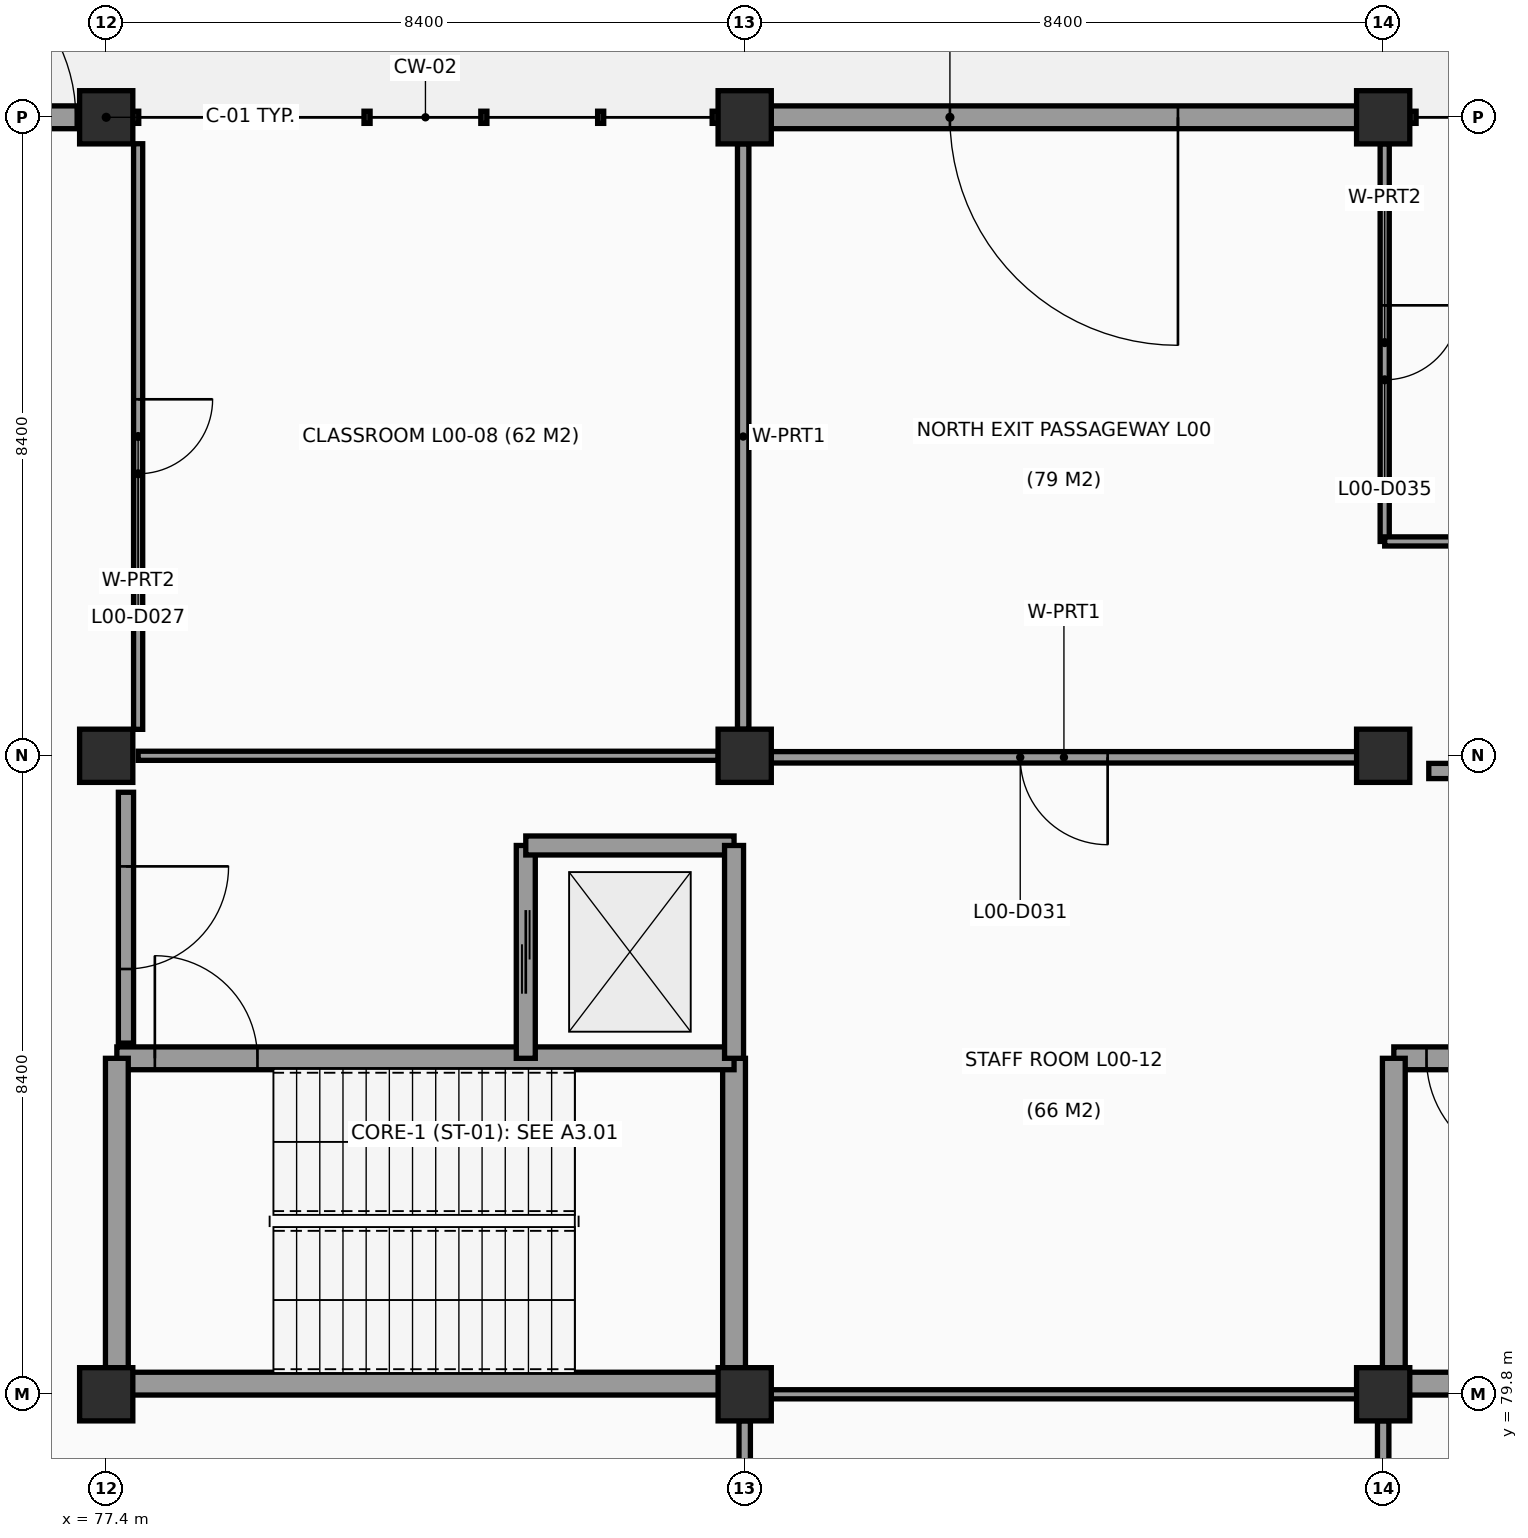
"""IFC4 building model, lengths in metres.
Left out: names, types, materials, properties, quantities, classifications, styles, units other than length and angle.
Written with IfcOpenShell. Run it as: python <this file> out.ifc"""

import sys

from ifc_helpers import new_model, si_unit, direction, frame, frame_2d, origin, origin_2d, place, context, subcontext, project, spatial, rectangle, extrude, element, fill, save


model = new_model("IFC4")
c1 = context("Model", 3, precision=1e-05, world=origin(), true_north=direction((0.0, 1.0)))
c2 = subcontext(c1, "Body", "Model", "MODEL_VIEW")
j1 = project(units=[si_unit("LENGTHUNIT", "METRE"), si_unit("PLANEANGLEUNIT", "RADIAN")], contexts=[c1])
p1 = place(None, origin())
s1 = spatial("IfcSite", under=j1, at=p1, CompositionType="ELEMENT")
p2 = place(p1, origin())
s2 = spatial("IfcBuilding", under=s1, at=p2, CompositionType="ELEMENT")
p3 = place(p2, origin())
s3 = spatial("IfcBuildingStorey", under=s2, at=p3, CompositionType="ELEMENT", Elevation=0.0)
for number, where, z_axis, x_axis in (
    (1, (77.4, 79.8, -0.4), (0.0, 0.0, 1.0), (1.0, 0.0, 0.0)),
    (2, (77.4, 88.2, -0.4), (0.0, 0.0, 1.0), (1.0, 0.0, 0.0)),
    (3, (77.4, 96.6, -0.4), (0.0, 0.0, 1.0), (1.0, 0.0, 0.0)),
    (4, (85.8, 79.8, -0.4), (0.0, 0.0, 1.0), (1.0, 0.0, 0.0)),
    (5, (85.8, 88.2, -0.4), (0.0, 0.0, 1.0), (1.0, 0.0, 0.0)),
    (6, (85.8, 96.6, -0.4), (0.0, 0.0, 1.0), (1.0, 0.0, 0.0)),
    (7, (94.2, 79.8, -0.4), (0.0, 0.0, 1.0), (1.0, 0.0, 0.0)),
    (8, (94.2, 88.2, -0.4), (0.0, 0.0, 1.0), (1.0, 0.0, 0.0)),
    (9, (94.2, 96.6, -0.4), (0.0, 0.0, 1.0), (1.0, 0.0, 0.0)),
):
    element("IfcColumn", number, at=place(p3, frame(where, z_axis=z_axis, x_axis=x_axis)), inside=s3, PredefinedType="COLUMN", context=c2, shape_type="SweptSolid", body=[
        extrude(rectangle(XDim=0.7, YDim=0.7, at=origin_2d()), origin(), (0.0, 0.0, 1.0), 4.6),
    ])
p4 = place(p3, frame((74.723, 96.6, 0.0), z_axis=(0.0, 0.0, 1.0), x_axis=(1.0, 0.0, 0.0)))
e10 = element("IfcWall", 10, at=p4, inside=s3, PredefinedType="SOLIDWALL", context=c2, shape_type="SweptSolid", body=[
    extrude(rectangle(XDim=2.329, YDim=0.3, at=frame_2d((1.165, 0.0))), origin(), (0.0, 0.0, 1.0), 3.22),
])
p5 = place(p4, frame((0.077, 0.0, 0.0)))
e11 = element("IfcOpeningElement", 11, at=p5, cuts=e10, PredefinedType="OPENING", context=c2, shape_type="SweptSolid", body=[
    extrude(rectangle(XDim=2.2, YDim=2.35, at=frame_2d((1.1, 1.175))), frame((0.0, 0.16, 0.0), z_axis=(0.0, -1.0, 0.0), x_axis=(1.0, 0.0, 0.0)), (0.0, 0.0, 1.0), 0.32),
])
p6 = place(p3, frame((86.148, 96.6, 0.0), z_axis=(0.0, 0.0, 1.0), x_axis=(1.0, 0.0, 0.0)))
e12 = element("IfcWall", 12, at=p6, inside=s3, PredefinedType="SOLIDWALL", context=c2, shape_type="SweptSolid", body=[
    extrude(rectangle(XDim=7.704, YDim=0.3, at=frame_2d((3.852, 0.0))), origin(), (0.0, 0.0, 1.0), 3.22),
])
p7 = place(p6, frame((2.352, 0.0, 0.0)))
e13 = element("IfcOpeningElement", 13, at=p7, cuts=e12, PredefinedType="OPENING", context=c2, shape_type="SweptSolid", body=[
    extrude(rectangle(XDim=3.0, YDim=2.5, at=frame_2d((1.5, 1.25))), frame((0.0, 0.16, 0.0), z_axis=(0.0, -1.0, 0.0), x_axis=(1.0, 0.0, 0.0)), (0.0, 0.0, 1.0), 0.32),
])
p8 = place(p3, frame((77.54, 79.94, -0.4), z_axis=(0.0, 0.0, 1.0), x_axis=(1.0, 0.0, 0.0)))
e14 = element("IfcWall", 14, at=p8, inside=s3, PredefinedType="SHEAR", context=c2, shape_type="SweptSolid", body=[
    extrude(rectangle(XDim=8.12, YDim=0.3, at=frame_2d((4.06, 0.0))), origin(), (0.0, 0.0, 1.0), 4.6),
])
p9 = place(p3, frame((85.66, 79.94, -0.4), z_axis=(0.0, 0.0, 1.0), x_axis=(0.0, 1.0, 0.0)))
e15 = element("IfcWall", 15, at=p9, inside=s3, PredefinedType="SHEAR", context=c2, shape_type="SweptSolid", body=[
    extrude(rectangle(XDim=4.28, YDim=0.3, at=frame_2d((2.14, 0.0))), origin(), (0.0, 0.0, 1.0), 4.6),
])
p10 = place(p3, frame((85.66, 84.22, -0.4), z_axis=(0.0, 0.0, 1.0), x_axis=(-1.0, 0.0, 0.0)))
e16 = element("IfcWall", 16, at=p10, inside=s3, PredefinedType="SHEAR", context=c2, shape_type="SweptSolid", body=[
    extrude(rectangle(XDim=8.12, YDim=0.3, at=frame_2d((4.06, 0.0))), origin(), (0.0, 0.0, 1.0), 4.6),
])
p11 = place(p10, frame((6.27, 0.0, 0.4)))
e17 = element("IfcOpeningElement", 17, at=p11, cuts=e16, PredefinedType="OPENING", context=c2, shape_type="SweptSolid", body=[
    extrude(rectangle(XDim=1.35, YDim=2.15, at=frame_2d((0.675, 1.075))), frame((0.0, 0.16, 0.0), z_axis=(0.0, -1.0, 0.0), x_axis=(1.0, 0.0, 0.0)), (0.0, 0.0, 1.0), 0.32),
])
p12 = place(p3, frame((77.54, 84.22, -0.4), z_axis=(0.0, 0.0, 1.0), x_axis=(0.0, -1.0, 0.0)))
e18 = element("IfcWall", 18, at=p12, inside=s3, PredefinedType="SHEAR", context=c2, shape_type="SweptSolid", body=[
    extrude(rectangle(XDim=4.28, YDim=0.3, at=frame_2d((2.14, 0.0))), origin(), (0.0, 0.0, 1.0), 4.6),
])
p13 = place(p3, frame((82.92, 87.02, -0.4), z_axis=(0.0, 0.0, 1.0), x_axis=(0.0, -1.0, 0.0)))
e19 = element("IfcWall", 19, at=p13, inside=s3, PredefinedType="SHEAR", context=c2, shape_type="SweptSolid", body=[
    extrude(rectangle(XDim=2.8, YDim=0.25, at=frame_2d((1.4, 0.0))), origin(), (0.0, 0.0, 1.0), 4.6),
])
p14 = place(p13, frame((0.85, 0.0, 0.4)))
e20 = element("IfcOpeningElement", 20, at=p14, cuts=e19, PredefinedType="OPENING", context=c2, shape_type="SweptSolid", body=[
    extrude(rectangle(XDim=1.1, YDim=2.15, at=frame_2d((0.55, 1.075))), frame((0.0, 0.135, 0.0), z_axis=(0.0, -1.0, 0.0), x_axis=(1.0, 0.0, 0.0)), (0.0, 0.0, 1.0), 0.27),
])
p15 = place(p3, frame((85.66, 87.02, -0.4), z_axis=(0.0, 0.0, 1.0), x_axis=(-1.0, 0.0, 0.0)))
e21 = element("IfcWall", 21, at=p15, inside=s3, PredefinedType="SHEAR", context=c2, shape_type="SweptSolid", body=[
    extrude(rectangle(XDim=2.74, YDim=0.25, at=frame_2d((1.37, 0.0))), origin(), (0.0, 0.0, 1.0), 4.6),
])
p16 = place(p3, frame((85.66, 84.22, -0.4), z_axis=(0.0, 0.0, 1.0), x_axis=(0.0, 1.0, 0.0)))
e22 = element("IfcWall", 22, at=p16, inside=s3, PredefinedType="SHEAR", context=c2, shape_type="SweptSolid", body=[
    extrude(rectangle(XDim=2.8, YDim=0.25, at=frame_2d((1.4, 0.0))), origin(), (0.0, 0.0, 1.0), 4.6),
])
p17 = place(p3, frame((94.34, 79.94, -0.4), z_axis=(0.0, 0.0, 1.0), x_axis=(1.0, 0.0, 0.0)))
e23 = element("IfcWall", 23, at=p17, inside=s3, PredefinedType="SHEAR", context=c2, shape_type="SweptSolid", body=[
    extrude(rectangle(XDim=8.12, YDim=0.3, at=frame_2d((4.06, 0.0))), origin(), (0.0, 0.0, 1.0), 4.6),
])
p18 = place(p3, frame((102.46, 84.22, -0.4), z_axis=(0.0, 0.0, 1.0), x_axis=(-1.0, 0.0, 0.0)))
e24 = element("IfcWall", 24, at=p18, inside=s3, PredefinedType="SHEAR", context=c2, shape_type="SweptSolid", body=[
    extrude(rectangle(XDim=8.12, YDim=0.3, at=frame_2d((4.06, 0.0))), origin(), (0.0, 0.0, 1.0), 4.6),
])
p19 = place(p18, frame((6.27, 0.0, 0.4)))
e25 = element("IfcOpeningElement", 25, at=p19, cuts=e24, PredefinedType="OPENING", context=c2, shape_type="SweptSolid", body=[
    extrude(rectangle(XDim=1.42, YDim=2.15, at=frame_2d((0.71, 1.075))), frame((0.0, 0.16, 0.0), z_axis=(0.0, -1.0, 0.0), x_axis=(1.0, 0.0, 0.0)), (0.0, 0.0, 1.0), 0.32),
])
p20 = place(p3, frame((94.34, 84.22, -0.4), z_axis=(0.0, 0.0, 1.0), x_axis=(0.0, -1.0, 0.0)))
e26 = element("IfcWall", 26, at=p20, inside=s3, PredefinedType="SHEAR", context=c2, shape_type="SweptSolid", body=[
    extrude(rectangle(XDim=4.28, YDim=0.3, at=frame_2d((2.14, 0.0))), origin(), (0.0, 0.0, 1.0), 4.6),
])
p21 = place(p3, frame((77.66, 87.72, 0.0), z_axis=(0.0, 0.0, 1.0), x_axis=(0.0, -1.0, 0.0)))
e27 = element("IfcWall", 27, at=p21, inside=s3, PredefinedType="PARTITIONING", context=c2, shape_type="SweptSolid", body=[
    extrude(rectangle(XDim=3.3, YDim=0.2, at=frame_2d((1.65, 0.0))), origin(), (0.0, 0.0, 1.0), 3.92),
])
p22 = place(p21, frame((0.975, 0.0, 0.0)))
e28 = element("IfcOpeningElement", 28, at=p22, cuts=e27, PredefinedType="OPENING", context=c2, shape_type="SweptSolid", body=[
    extrude(rectangle(XDim=1.35, YDim=2.15, at=frame_2d((0.675, 1.075))), frame((0.0, 0.11, 0.0), z_axis=(0.0, -1.0, 0.0), x_axis=(1.0, 0.0, 0.0)), (0.0, 0.0, 1.0), 0.22),
])
p23 = place(p3, frame((98.4, 88.0, 0.0), z_axis=(0.0, 0.0, 1.0), x_axis=(-1.0, 0.0, 0.0)))
e29 = element("IfcWall", 29, at=p23, inside=s3, PredefinedType="PARTITIONING", context=c2, shape_type="SweptSolid", body=[
    extrude(rectangle(XDim=3.6, YDim=0.2, at=frame_2d((1.8, 0.0))), origin(), (0.0, 0.0, 1.0), 3.92),
])
p24 = place(p23, frame((1.125, 0.0, 0.0)))
e30 = element("IfcOpeningElement", 30, at=p24, cuts=e29, PredefinedType="OPENING", context=c2, shape_type="SweptSolid", body=[
    extrude(rectangle(XDim=1.35, YDim=2.15, at=frame_2d((0.675, 1.075))), frame((0.0, 0.11, 0.0), z_axis=(0.0, -1.0, 0.0), x_axis=(1.0, 0.0, 0.0)), (0.0, 0.0, 1.0), 0.22),
])
p25 = place(p3, frame((77.82, 88.548, 0.0), z_axis=(0.0, 0.0, 1.0), x_axis=(0.0, 1.0, 0.0)))
e31 = element("IfcWall", 31, at=p25, inside=s3, PredefinedType="PARTITIONING", context=c2, shape_type="SweptSolid", body=[
    extrude(rectangle(XDim=7.704, YDim=0.12, at=frame_2d((3.852, 0.0))), origin(), (0.0, 0.0, 1.0), 3.65),
])
p26 = place(p25, frame((3.362, 0.0, 0.0)))
e32 = element("IfcOpeningElement", 32, at=p26, cuts=e31, PredefinedType="OPENING", context=c2, shape_type="SweptSolid", body=[
    extrude(rectangle(XDim=0.98, YDim=2.12, at=frame_2d((0.49, 1.06))), frame((0.0, 0.07, 0.0), z_axis=(0.0, -1.0, 0.0), x_axis=(1.0, 0.0, 0.0)), (0.0, 0.0, 1.0), 0.14),
])
p27 = place(p3, frame((85.78, 96.252, 0.0), z_axis=(0.0, 0.0, 1.0), x_axis=(0.0, -1.0, 0.0)))
e33 = element("IfcWall", 33, at=p27, inside=s3, PredefinedType="PARTITIONING", context=c2, shape_type="SweptSolid", body=[
    extrude(rectangle(XDim=7.704, YDim=0.15, at=frame_2d((3.852, 0.0))), origin(), (0.0, 0.0, 1.0), 3.32),
])
p28 = place(p3, frame((85.452, 88.2, 0.0), z_axis=(0.0, 0.0, 1.0), x_axis=(-1.0, 0.0, 0.0)))
e34 = element("IfcWall", 34, at=p28, inside=s3, PredefinedType="PARTITIONING", context=c2, shape_type="SweptSolid", body=[
    extrude(rectangle(XDim=7.632, YDim=0.12, at=frame_2d((3.816, 0.0))), origin(), (0.0, 0.0, 1.0), 3.47),
])
p29 = place(p3, frame((85.8, 73.8, 0.0), z_axis=(0.0, 0.0, 1.0), x_axis=(0.0, 1.0, 0.0)))
e35 = element("IfcWall", 35, at=p29, inside=s3, PredefinedType="PARTITIONING", context=c2, shape_type="SweptSolid", body=[
    extrude(rectangle(XDim=5.652, YDim=0.15, at=frame_2d((2.826, 0.0))), origin(), (0.0, 0.0, 1.0), 3.32),
])
p30 = place(p29, frame((2.376, 0.0, 0.0)))
e36 = element("IfcOpeningElement", 36, at=p30, cuts=e35, PredefinedType="OPENING", context=c2, shape_type="SweptSolid", body=[
    extrude(rectangle(XDim=0.9, YDim=2.05, at=frame_2d((0.45, 1.025))), frame((0.0, 0.085, 0.0), z_axis=(0.0, -1.0, 0.0), x_axis=(1.0, 0.0, 0.0)), (0.0, 0.0, 1.0), 0.17),
])
p31 = place(p3, frame((86.148, 79.8, 0.0), z_axis=(0.0, 0.0, 1.0), x_axis=(1.0, 0.0, 0.0)))
e37 = element("IfcWall", 37, at=p31, inside=s3, PredefinedType="PARTITIONING", context=c2, shape_type="SweptSolid", body=[
    extrude(rectangle(XDim=7.704, YDim=0.12, at=frame_2d((3.852, 0.0))), origin(), (0.0, 0.0, 1.0), 3.12),
])
p32 = place(p3, frame((94.2, 79.452, 0.0), z_axis=(0.0, 0.0, 1.0), x_axis=(0.0, -1.0, 0.0)))
e38 = element("IfcWall", 38, at=p32, inside=s3, PredefinedType="PARTITIONING", context=c2, shape_type="SweptSolid", body=[
    extrude(rectangle(XDim=5.652, YDim=0.15, at=frame_2d((2.826, 0.0))), origin(), (0.0, 0.0, 1.0), 3.52),
])
p33 = place(p3, frame((86.148, 88.18, 0.0), z_axis=(0.0, 0.0, 1.0), x_axis=(1.0, 0.0, 0.0)))
e39 = element("IfcWall", 39, at=p33, inside=s3, PredefinedType="PARTITIONING", context=c2, shape_type="SweptSolid", body=[
    extrude(rectangle(XDim=7.704, YDim=0.15, at=frame_2d((3.852, 0.0))), origin(), (0.0, 0.0, 1.0), 3.47),
])
p34 = place(p33, frame((3.277, 0.0, 0.0)))
e40 = element("IfcOpeningElement", 40, at=p34, cuts=e39, PredefinedType="OPENING", context=c2, shape_type="SweptSolid", body=[
    extrude(rectangle(XDim=1.15, YDim=2.15, at=frame_2d((0.575, 1.075))), frame((0.0, 0.085, 0.0), z_axis=(0.0, -1.0, 0.0), x_axis=(1.0, 0.0, 0.0)), (0.0, 0.0, 1.0), 0.17),
])
p35 = place(p3, frame((94.22, 91.02, 0.0), z_axis=(0.0, 0.0, 1.0), x_axis=(0.0, 1.0, 0.0)))
e41 = element("IfcWall", 41, at=p35, inside=s3, PredefinedType="PARTITIONING", context=c2, shape_type="SweptSolid", body=[
    extrude(rectangle(XDim=5.232, YDim=0.12, at=frame_2d((2.616, 0.0))), origin(), (0.0, 0.0, 1.0), 3.52),
])
p36 = place(p35, frame((2.126, 0.0, 0.0)))
e42 = element("IfcOpeningElement", 42, at=p36, cuts=e41, PredefinedType="OPENING", context=c2, shape_type="SweptSolid", body=[
    extrude(rectangle(XDim=0.98, YDim=2.12, at=frame_2d((0.49, 1.06))), frame((0.0, 0.07, 0.0), z_axis=(0.0, -1.0, 0.0), x_axis=(1.0, 0.0, 0.0)), (0.0, 0.0, 1.0), 0.14),
])
p37 = place(p3, frame((99.249, 91.02, 0.0), z_axis=(0.0, 0.0, 1.0), x_axis=(-1.0, 0.0, 0.0)))
e43 = element("IfcWall", 43, at=p37, inside=s3, PredefinedType="PARTITIONING", context=c2, shape_type="SweptSolid", body=[
    extrude(rectangle(XDim=5.029, YDim=0.12, at=frame_2d((2.514, 0.0))), origin(), (0.0, 0.0, 1.0), 3.47),
])
p38 = place(p7, origin())
e44 = element("IfcDoor", 44, at=p38, inside=s3, OperationType="DOUBLE_DOOR_SINGLE_SWING", PredefinedType="GATE", context=c2, shape_type="SweptSolid", body=[
    extrude(rectangle(XDim=3.0, YDim=2.5, at=frame_2d((1.5, 1.25))), frame((0.0, 0.025, 0.0), z_axis=(0.0, -1.0, 0.0), x_axis=(1.0, 0.0, 0.0)), (0.0, 0.0, 1.0), 0.05),
])
fill(e13, e44)
p39 = place(p11, origin())
e45 = element("IfcDoor", 45, at=p39, inside=s3, OperationType="SINGLE_SWING_RIGHT", PredefinedType="DOOR", context=c2, shape_type="SweptSolid", body=[
    extrude(rectangle(XDim=1.35, YDim=2.15, at=frame_2d((0.675, 1.075))), frame((0.0, 0.025, 0.0), z_axis=(0.0, -1.0, 0.0), x_axis=(1.0, 0.0, 0.0)), (0.0, 0.0, 1.0), 0.05),
])
fill(e17, e45)
p40 = place(p14, origin())
e46 = element("IfcDoor", 46, at=p40, inside=s3, OperationType="DOUBLE_DOOR_SLIDING", PredefinedType="DOOR", context=c2, shape_type="SweptSolid", body=[
    extrude(rectangle(XDim=1.1, YDim=2.15, at=frame_2d((0.55, 1.075))), frame((0.0, 0.025, 0.0), z_axis=(0.0, -1.0, 0.0), x_axis=(1.0, 0.0, 0.0)), (0.0, 0.0, 1.0), 0.05),
])
fill(e20, e46)
p41 = place(p19, origin())
e47 = element("IfcDoor", 47, at=p41, inside=s3, OperationType="SINGLE_SWING_LEFT", PredefinedType="DOOR", context=c2, shape_type="SweptSolid", body=[
    extrude(rectangle(XDim=1.42, YDim=2.15, at=frame_2d((0.71, 1.075))), frame((0.0, 0.025, 0.0), z_axis=(0.0, -1.0, 0.0), x_axis=(1.0, 0.0, 0.0)), (0.0, 0.0, 1.0), 0.05),
])
fill(e25, e47)
p42 = place(p22, origin())
e48 = element("IfcDoor", 48, at=p42, inside=s3, OperationType="SINGLE_SWING_LEFT", PredefinedType="DOOR", context=c2, shape_type="SweptSolid", body=[
    extrude(rectangle(XDim=1.35, YDim=2.15, at=frame_2d((0.675, 1.075))), frame((0.0, 0.025, 0.0), z_axis=(0.0, -1.0, 0.0), x_axis=(1.0, 0.0, 0.0)), (0.0, 0.0, 1.0), 0.05),
])
fill(e28, e48)
p43 = place(p5, origin())
e49 = element("IfcDoor", 49, at=p43, inside=s3, OperationType="SINGLE_SWING_LEFT", PredefinedType="DOOR", context=c2, shape_type="SweptSolid", body=[
    extrude(rectangle(XDim=2.2, YDim=2.35, at=frame_2d((1.1, 1.175))), frame((0.0, 0.025, 0.0), z_axis=(0.0, -1.0, 0.0), x_axis=(1.0, 0.0, 0.0)), (0.0, 0.0, 1.0), 0.05),
])
fill(e11, e49)
p44 = place(p26, origin())
e50 = element("IfcDoor", 50, at=p44, inside=s3, OperationType="SINGLE_SWING_RIGHT", PredefinedType="DOOR", context=c2, shape_type="SweptSolid", body=[
    extrude(rectangle(XDim=0.98, YDim=2.12, at=frame_2d((0.49, 1.06))), frame((0.0, 0.025, 0.0), z_axis=(0.0, -1.0, 0.0), x_axis=(1.0, 0.0, 0.0)), (0.0, 0.0, 1.0), 0.05),
])
fill(e32, e50)
p45 = place(p34, origin())
e51 = element("IfcDoor", 51, at=p45, inside=s3, OperationType="SINGLE_SWING_RIGHT", PredefinedType="DOOR", context=c2, shape_type="SweptSolid", body=[
    extrude(rectangle(XDim=1.15, YDim=2.15, at=frame_2d((0.575, 1.075))), frame((0.0, 0.025, 0.0), z_axis=(0.0, -1.0, 0.0), x_axis=(1.0, 0.0, 0.0)), (0.0, 0.0, 1.0), 0.05),
])
fill(e40, e51)
p46 = place(p36, origin())
e52 = element("IfcDoor", 52, at=p46, inside=s3, OperationType="SINGLE_SWING_RIGHT", PredefinedType="DOOR", context=c2, shape_type="SweptSolid", body=[
    extrude(rectangle(XDim=0.98, YDim=2.12, at=frame_2d((0.49, 1.06))), frame((0.0, 0.025, 0.0), z_axis=(0.0, -1.0, 0.0), x_axis=(1.0, 0.0, 0.0)), (0.0, 0.0, 1.0), 0.05),
])
fill(e42, e52)
save(model, sys.argv[1])
